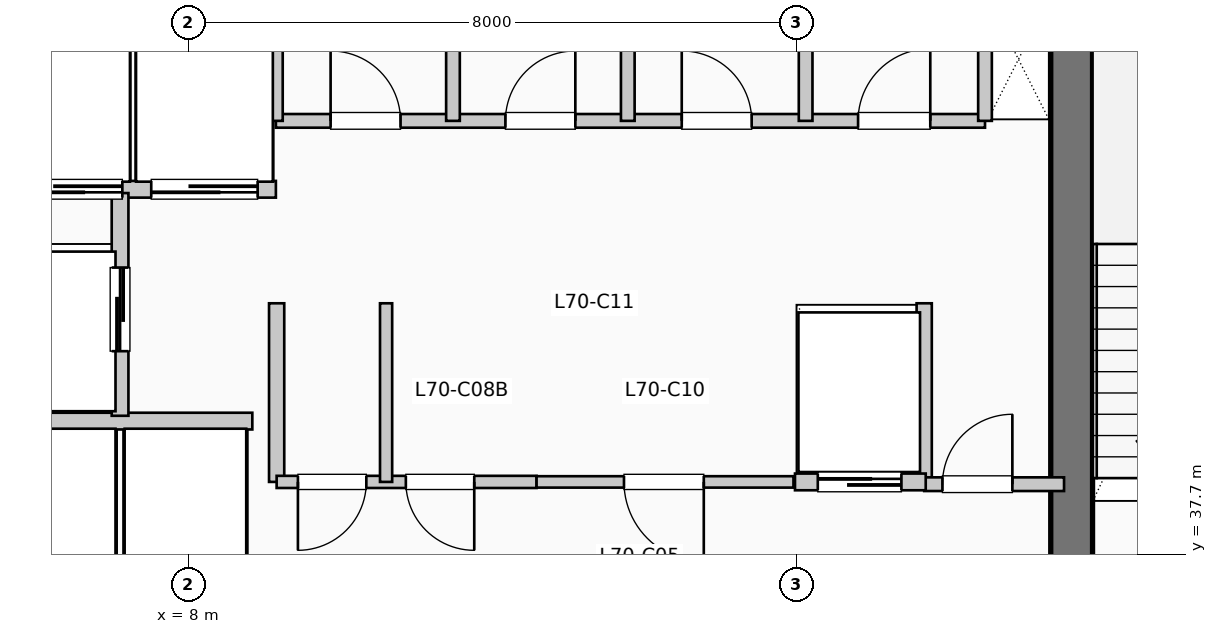
"""IFC4 building model, lengths in metres.
Left out: names, types, materials, properties, quantities, classifications, styles, units other than length and angle.
Written with IfcOpenShell. Run it as: python <this file> out.ifc"""

import sys

from ifc_helpers import new_model, si_unit, direction, frame, frame_2d, origin, place, context, subcontext, project, spatial, rectangle, extrude, element, fill, save


model = new_model("IFC4")
c1 = context("Model", 3, precision=1e-05, world=origin(), true_north=direction((0.0, 1.0)))
c2 = subcontext(c1, "Body", "Model", "MODEL_VIEW")
j1 = project(units=[si_unit("LENGTHUNIT", "METRE"), si_unit("PLANEANGLEUNIT", "RADIAN")], contexts=[c1])
p1 = place(None, origin())
s1 = spatial("IfcSite", under=j1, at=p1, CompositionType="ELEMENT")
p2 = place(p1, origin())
s2 = spatial("IfcBuilding", under=s1, at=p2, CompositionType="ELEMENT")
p3 = place(p2, frame((0.0, 0.0, 288.09)))
s3 = spatial("IfcBuildingStorey", under=s2, at=p3, CompositionType="ELEMENT", Elevation=288.09)
p4 = place(p3, frame((19.62, 37.15, 0.0), z_axis=(0.0, 0.0, 1.0), x_axis=(0.0, 1.0, 0.0)))
e1 = element("IfcWall", 1, at=p4, inside=s3, PredefinedType="SHEAR", context=c2, shape_type="SweptSolid", body=[
    extrude(rectangle(XDim=7.89, YDim=0.55, at=frame_2d((3.945, 0.0))), origin(), (0.0, 0.0, 1.0), 3.96),
])
p5 = place(p3, frame((5.38, 39.45, 0.0), z_axis=(0.0, 0.0, 1.0), x_axis=(1.0, 0.0, 0.0)))
e2 = element("IfcWall", 2, at=p5, inside=s3, PredefinedType="PARTITIONING", context=c2, shape_type="SweptSolid", body=[
    extrude(rectangle(XDim=3.46, YDim=0.22, at=frame_2d((1.73, 0.0))), origin(), (0.0, 0.0, 1.0), 3.74),
])
p6 = place(p3, frame((5.38, 42.5, 0.0), z_axis=(0.0, 0.0, 1.0), x_axis=(1.0, 0.0, 0.0)))
e3 = element("IfcWall", 3, at=p6, inside=s3, PredefinedType="PARTITIONING", context=c2, shape_type="SweptSolid", body=[
    extrude(rectangle(XDim=3.77, YDim=0.22, at=frame_2d((1.885, 0.0))), origin(), (0.0, 0.0, 1.0), 3.74),
])
p7 = place(p6, frame((1.75, 0.0, 0.0), z_axis=(0.0, 0.0, 1.0), x_axis=(-1.0, 0.0, 0.0)))
e4 = element("IfcOpeningElement", 4, at=p7, cuts=e3, PredefinedType="OPENING", context=c2, shape_type="SweptSolid", body=[
    extrude(rectangle(XDim=1.4, YDim=2.2, at=frame_2d((0.7, 1.1))), frame((0.0, 0.12, 0.0), z_axis=(0.0, -1.0, 0.0), x_axis=(1.0, 0.0, 0.0)), (0.0, 0.0, 1.0), 0.24),
])
p8 = place(p6, frame((3.53, 0.0, 0.0), z_axis=(0.0, 0.0, 1.0), x_axis=(-1.0, 0.0, 0.0)))
e5 = element("IfcOpeningElement", 5, at=p8, cuts=e3, PredefinedType="OPENING", context=c2, shape_type="SweptSolid", body=[
    extrude(rectangle(XDim=1.4, YDim=2.2, at=frame_2d((0.7, 1.1))), frame((0.0, 0.12, 0.0), z_axis=(0.0, -1.0, 0.0), x_axis=(1.0, 0.0, 0.0)), (0.0, 0.0, 1.0), 0.24),
])
p9 = place(p3, frame((7.1, 39.52, 0.0), z_axis=(0.0, 0.0, 1.0), x_axis=(0.0, 1.0, 0.0)))
e6 = element("IfcWall", 6, at=p9, inside=s3, PredefinedType="PARTITIONING", context=c2, shape_type="SweptSolid", body=[
    extrude(rectangle(XDim=2.93, YDim=0.22, at=frame_2d((1.465, 0.0))), origin(), (0.0, 0.0, 1.0), 3.74),
])
p10 = place(p9, frame((0.85, 0.0, 0.0)))
e7 = element("IfcOpeningElement", 7, at=p10, cuts=e6, PredefinedType="OPENING", context=c2, shape_type="SweptSolid", body=[
    extrude(rectangle(XDim=1.1, YDim=2.2, at=frame_2d((0.55, 1.1))), frame((0.0, 0.12, 0.0), z_axis=(0.0, -1.0, 0.0), x_axis=(1.0, 0.0, 0.0)), (0.0, 0.0, 1.0), 0.24),
])
for number, where, z_axis, x_axis in (
    (8, (9.16, 38.65, 0.0), (0.0, 0.0, 1.0), (0.0, 1.0, 0.0)),
    (9, (17.68, 38.65, 0.0), (0.0, 0.0, 1.0), (0.0, 1.0, 0.0)),
):
    element("IfcWall", number, at=place(p3, frame(where, z_axis=z_axis, x_axis=x_axis)), inside=s3, PredefinedType="PARTITIONING", context=c2, shape_type="SweptSolid", body=[
        extrude(rectangle(XDim=2.35, YDim=0.2, at=frame_2d((1.175, 0.0))), origin(), (0.0, 0.0, 1.0), 3.74),
    ])
p11 = place(p3, frame((17.68, 38.62, 0.0), z_axis=(0.0, 0.0, 1.0), x_axis=(1.0, 0.0, 0.0)))
e10 = element("IfcWall", 10, at=p11, inside=s3, PredefinedType="PARTITIONING", context=c2, shape_type="SweptSolid", body=[
    extrude(rectangle(XDim=1.84, YDim=0.18, at=frame_2d((0.92, 0.0))), origin(), (0.0, 0.0, 1.0), 3.74),
])
p12 = place(p11, frame((0.24, 0.0, 0.0)))
e11 = element("IfcOpeningElement", 11, at=p12, cuts=e10, PredefinedType="OPENING", context=c2, shape_type="SweptSolid", body=[
    extrude(rectangle(XDim=0.92, YDim=2.1, at=frame_2d((0.46, 1.05))), frame((0.0, 0.1, 0.0), z_axis=(0.0, -1.0, 0.0), x_axis=(1.0, 0.0, 0.0)), (0.0, 0.0, 1.0), 0.2),
])
p13 = place(p3, frame((9.16, 38.65, 0.0), z_axis=(0.0, 0.0, 1.0), x_axis=(1.0, 0.0, 0.0)))
e12 = element("IfcWall", 12, at=p13, inside=s3, PredefinedType="PARTITIONING", context=c2, shape_type="SweptSolid", body=[
    extrude(rectangle(XDim=3.42, YDim=0.16, at=frame_2d((1.71, 0.0))), origin(), (0.0, 0.0, 1.0), 3.74),
])
p14 = place(p13, frame((1.18, 0.0, 0.0), z_axis=(0.0, 0.0, 1.0), x_axis=(-1.0, 0.0, 0.0)))
e13 = element("IfcOpeningElement", 13, at=p14, cuts=e12, PredefinedType="OPENING", context=c2, shape_type="SweptSolid", body=[
    extrude(rectangle(XDim=0.9, YDim=2.15, at=frame_2d((0.45, 1.075))), frame((0.0, 0.09, 0.0), z_axis=(0.0, -1.0, 0.0), x_axis=(1.0, 0.0, 0.0)), (0.0, 0.0, 1.0), 0.18),
])
p15 = place(p13, frame((2.6, 0.0, 0.0), z_axis=(0.0, 0.0, 1.0), x_axis=(-1.0, 0.0, 0.0)))
e14 = element("IfcOpeningElement", 14, at=p15, cuts=e12, PredefinedType="OPENING", context=c2, shape_type="SweptSolid", body=[
    extrude(rectangle(XDim=0.9, YDim=2.15, at=frame_2d((0.45, 1.075))), frame((0.0, 0.09, 0.0), z_axis=(0.0, -1.0, 0.0), x_axis=(1.0, 0.0, 0.0)), (0.0, 0.0, 1.0), 0.18),
])
p16 = place(p3, frame((10.6, 38.65, 0.0), z_axis=(0.0, 0.0, 1.0), x_axis=(0.0, 1.0, 0.0)))
e15 = element("IfcWall", 15, at=p16, inside=s3, PredefinedType="PARTITIONING", context=c2, shape_type="SweptSolid", body=[
    extrude(rectangle(XDim=2.35, YDim=0.16, at=frame_2d((1.175, 0.0))), origin(), (0.0, 0.0, 1.0), 3.74),
])
p17 = place(p3, frame((12.58, 38.65, 0.0), z_axis=(0.0, 0.0, 1.0), x_axis=(1.0, 0.0, 0.0)))
e16 = element("IfcWall", 16, at=p17, inside=s3, PredefinedType="PARTITIONING", context=c2, shape_type="SweptSolid", body=[
    extrude(rectangle(XDim=3.38, YDim=0.15, at=frame_2d((1.69, 0.0))), origin(), (0.0, 0.0, 1.0), 3.74),
])
p18 = place(p17, frame((2.2, 0.0, 0.0), z_axis=(0.0, 0.0, 1.0), x_axis=(-1.0, 0.0, 0.0)))
e17 = element("IfcOpeningElement", 17, at=p18, cuts=e16, PredefinedType="OPENING", context=c2, shape_type="SweptSolid", body=[
    extrude(rectangle(XDim=1.05, YDim=2.15, at=frame_2d((0.525, 1.075))), frame((0.0, 0.085, 0.0), z_axis=(0.0, -1.0, 0.0), x_axis=(1.0, 0.0, 0.0)), (0.0, 0.0, 1.0), 0.17),
])
p19 = place(p3, frame((15.98, 38.65, 0.0), z_axis=(0.0, 0.0, 1.0), x_axis=(1.0, 0.0, 0.0)))
e18 = element("IfcWall", 18, at=p19, inside=s3, PredefinedType="PARTITIONING", context=c2, shape_type="SweptSolid", body=[
    extrude(rectangle(XDim=1.72, YDim=0.22, at=frame_2d((0.86, 0.0))), origin(), (0.0, 0.0, 1.0), 3.74),
])
p20 = place(p19, frame((0.3, 0.0, 0.0)))
e19 = element("IfcOpeningElement", 19, at=p20, cuts=e18, PredefinedType="OPENING", context=c2, shape_type="SweptSolid", body=[
    extrude(rectangle(XDim=1.1, YDim=2.2, at=frame_2d((0.55, 1.1))), frame((0.0, 0.12, 0.0), z_axis=(0.0, -1.0, 0.0), x_axis=(1.0, 0.0, 0.0)), (0.0, 0.0, 1.0), 0.24),
])
p21 = place(p3, frame((9.15, 43.4, 0.0), z_axis=(0.0, 0.0, 1.0), x_axis=(1.0, 0.0, 0.0)))
e20 = element("IfcWall", 20, at=p21, inside=s3, PredefinedType="PLUMBINGWALL", context=c2, shape_type="SweptSolid", body=[
    extrude(rectangle(XDim=9.33, YDim=0.18, at=frame_2d((4.665, 0.0))), origin(), (0.0, 0.0, 1.0), 3.74),
])
p22 = place(p21, frame((0.72, 0.0, 0.0)))
e21 = element("IfcOpeningElement", 21, at=p22, cuts=e20, PredefinedType="OPENING", context=c2, shape_type="SweptSolid", body=[
    extrude(rectangle(XDim=0.92, YDim=2.1, at=frame_2d((0.46, 1.05))), frame((0.0, 0.1, 0.0), z_axis=(0.0, -1.0, 0.0), x_axis=(1.0, 0.0, 0.0)), (0.0, 0.0, 1.0), 0.2),
])
p23 = place(p21, frame((3.02, 0.0, 0.0)))
e22 = element("IfcOpeningElement", 22, at=p23, cuts=e20, PredefinedType="OPENING", context=c2, shape_type="SweptSolid", body=[
    extrude(rectangle(XDim=0.92, YDim=2.1, at=frame_2d((0.46, 1.05))), frame((0.0, 0.1, 0.0), z_axis=(0.0, -1.0, 0.0), x_axis=(1.0, 0.0, 0.0)), (0.0, 0.0, 1.0), 0.2),
])
p24 = place(p21, frame((5.34, 0.0, 0.0)))
e23 = element("IfcOpeningElement", 23, at=p24, cuts=e20, PredefinedType="OPENING", context=c2, shape_type="SweptSolid", body=[
    extrude(rectangle(XDim=0.92, YDim=2.1, at=frame_2d((0.46, 1.05))), frame((0.0, 0.1, 0.0), z_axis=(0.0, -1.0, 0.0), x_axis=(1.0, 0.0, 0.0)), (0.0, 0.0, 1.0), 0.2),
])
p25 = place(p21, frame((7.66, 0.0, 0.0)))
e24 = element("IfcOpeningElement", 24, at=p25, cuts=e20, PredefinedType="OPENING", context=c2, shape_type="SweptSolid", body=[
    extrude(rectangle(XDim=0.95, YDim=2.1, at=frame_2d((0.475, 1.05))), frame((0.0, 0.1, 0.0), z_axis=(0.0, -1.0, 0.0), x_axis=(1.0, 0.0, 0.0)), (0.0, 0.0, 1.0), 0.2),
])
for number, where, z_axis, x_axis in (
    (25, (9.15, 43.4, 0.0), (0.0, 0.0, 1.0), (0.0, 1.0, 0.0)),
    (26, (18.48, 43.4, 0.0), (0.0, 0.0, 1.0), (0.0, 1.0, 0.0)),
    (27, (11.48, 43.4, 0.0), (0.0, 0.0, 1.0), (0.0, 1.0, 0.0)),
    (28, (13.78, 43.4, 0.0), (0.0, 0.0, 1.0), (0.0, 1.0, 0.0)),
    (29, (16.12, 43.4, 0.0), (0.0, 0.0, 1.0), (0.0, 1.0, 0.0)),
):
    element("IfcWall", number, at=place(p3, frame(where, z_axis=z_axis, x_axis=x_axis)), inside=s3, PredefinedType="PLUMBINGWALL", context=c2, shape_type="SweptSolid", body=[
        extrude(rectangle(XDim=1.88, YDim=0.18, at=frame_2d((0.94, 0.0))), origin(), (0.0, 0.0, 1.0), 3.74),
    ])
p26 = place(p7, origin())
e30 = element("IfcDoor", 30, at=p26, inside=s3, OperationType="SLIDING_TO_LEFT", PredefinedType="DOOR", context=c2, shape_type="SweptSolid", body=[
    extrude(rectangle(XDim=1.4, YDim=2.2, at=frame_2d((0.7, 1.1))), frame((0.0, 0.025, 0.0), z_axis=(0.0, -1.0, 0.0), x_axis=(1.0, 0.0, 0.0)), (0.0, 0.0, 1.0), 0.05),
])
fill(e4, e30)
p27 = place(p8, origin())
e31 = element("IfcDoor", 31, at=p27, inside=s3, OperationType="SLIDING_TO_LEFT", PredefinedType="DOOR", context=c2, shape_type="SweptSolid", body=[
    extrude(rectangle(XDim=1.4, YDim=2.2, at=frame_2d((0.7, 1.1))), frame((0.0, 0.025, 0.0), z_axis=(0.0, -1.0, 0.0), x_axis=(1.0, 0.0, 0.0)), (0.0, 0.0, 1.0), 0.05),
])
fill(e5, e31)
p28 = place(p10, origin())
e32 = element("IfcDoor", 32, at=p28, inside=s3, OperationType="SLIDING_TO_LEFT", PredefinedType="DOOR", context=c2, shape_type="SweptSolid", body=[
    extrude(rectangle(XDim=1.1, YDim=2.2, at=frame_2d((0.55, 1.1))), frame((0.0, 0.025, 0.0), z_axis=(0.0, -1.0, 0.0), x_axis=(1.0, 0.0, 0.0)), (0.0, 0.0, 1.0), 0.05),
])
fill(e7, e32)
p29 = place(p12, origin())
e33 = element("IfcDoor", 33, at=p29, inside=s3, OperationType="SINGLE_SWING_RIGHT", PredefinedType="DOOR", context=c2, shape_type="SweptSolid", body=[
    extrude(rectangle(XDim=0.92, YDim=2.1, at=frame_2d((0.46, 1.05))), frame((0.0, 0.025, 0.0), z_axis=(0.0, -1.0, 0.0), x_axis=(1.0, 0.0, 0.0)), (0.0, 0.0, 1.0), 0.05),
])
fill(e11, e33)
p30 = place(p14, origin())
e34 = element("IfcDoor", 34, at=p30, inside=s3, OperationType="SINGLE_SWING_LEFT", PredefinedType="DOOR", context=c2, shape_type="SweptSolid", body=[
    extrude(rectangle(XDim=0.9, YDim=2.15, at=frame_2d((0.45, 1.075))), frame((0.0, 0.025, 0.0), z_axis=(0.0, -1.0, 0.0), x_axis=(1.0, 0.0, 0.0)), (0.0, 0.0, 1.0), 0.05),
])
fill(e13, e34)
p31 = place(p15, origin())
e35 = element("IfcDoor", 35, at=p31, inside=s3, OperationType="SINGLE_SWING_RIGHT", PredefinedType="DOOR", context=c2, shape_type="SweptSolid", body=[
    extrude(rectangle(XDim=0.9, YDim=2.15, at=frame_2d((0.45, 1.075))), frame((0.0, 0.025, 0.0), z_axis=(0.0, -1.0, 0.0), x_axis=(1.0, 0.0, 0.0)), (0.0, 0.0, 1.0), 0.05),
])
fill(e14, e35)
p32 = place(p18, origin())
e36 = element("IfcDoor", 36, at=p32, inside=s3, OperationType="SINGLE_SWING_RIGHT", PredefinedType="DOOR", context=c2, shape_type="SweptSolid", body=[
    extrude(rectangle(XDim=1.05, YDim=2.15, at=frame_2d((0.525, 1.075))), frame((0.0, 0.025, 0.0), z_axis=(0.0, -1.0, 0.0), x_axis=(1.0, 0.0, 0.0)), (0.0, 0.0, 1.0), 0.05),
])
fill(e17, e36)
p33 = place(p20, origin())
e37 = element("IfcDoor", 37, at=p33, inside=s3, OperationType="SLIDING_TO_LEFT", PredefinedType="DOOR", context=c2, shape_type="SweptSolid", body=[
    extrude(rectangle(XDim=1.1, YDim=2.2, at=frame_2d((0.55, 1.1))), frame((0.0, 0.025, 0.0), z_axis=(0.0, -1.0, 0.0), x_axis=(1.0, 0.0, 0.0)), (0.0, 0.0, 1.0), 0.05),
])
fill(e19, e37)
p34 = place(p22, origin())
e38 = element("IfcDoor", 38, at=p34, inside=s3, OperationType="SINGLE_SWING_LEFT", PredefinedType="DOOR", context=c2, shape_type="SweptSolid", body=[
    extrude(rectangle(XDim=0.92, YDim=2.1, at=frame_2d((0.46, 1.05))), frame((0.0, 0.025, 0.0), z_axis=(0.0, -1.0, 0.0), x_axis=(1.0, 0.0, 0.0)), (0.0, 0.0, 1.0), 0.05),
])
fill(e21, e38)
p35 = place(p23, origin())
e39 = element("IfcDoor", 39, at=p35, inside=s3, OperationType="SINGLE_SWING_RIGHT", PredefinedType="DOOR", context=c2, shape_type="SweptSolid", body=[
    extrude(rectangle(XDim=0.92, YDim=2.1, at=frame_2d((0.46, 1.05))), frame((0.0, 0.025, 0.0), z_axis=(0.0, -1.0, 0.0), x_axis=(1.0, 0.0, 0.0)), (0.0, 0.0, 1.0), 0.05),
])
fill(e22, e39)
p36 = place(p24, origin())
e40 = element("IfcDoor", 40, at=p36, inside=s3, OperationType="SINGLE_SWING_LEFT", PredefinedType="DOOR", context=c2, shape_type="SweptSolid", body=[
    extrude(rectangle(XDim=0.92, YDim=2.1, at=frame_2d((0.46, 1.05))), frame((0.0, 0.025, 0.0), z_axis=(0.0, -1.0, 0.0), x_axis=(1.0, 0.0, 0.0)), (0.0, 0.0, 1.0), 0.05),
])
fill(e23, e40)
p37 = place(p25, origin())
e41 = element("IfcDoor", 41, at=p37, inside=s3, OperationType="SINGLE_SWING_RIGHT", PredefinedType="DOOR", context=c2, shape_type="SweptSolid", body=[
    extrude(rectangle(XDim=0.95, YDim=2.1, at=frame_2d((0.475, 1.05))), frame((0.0, 0.025, 0.0), z_axis=(0.0, -1.0, 0.0), x_axis=(1.0, 0.0, 0.0)), (0.0, 0.0, 1.0), 0.05),
])
fill(e24, e41)
save(model, sys.argv[1])
